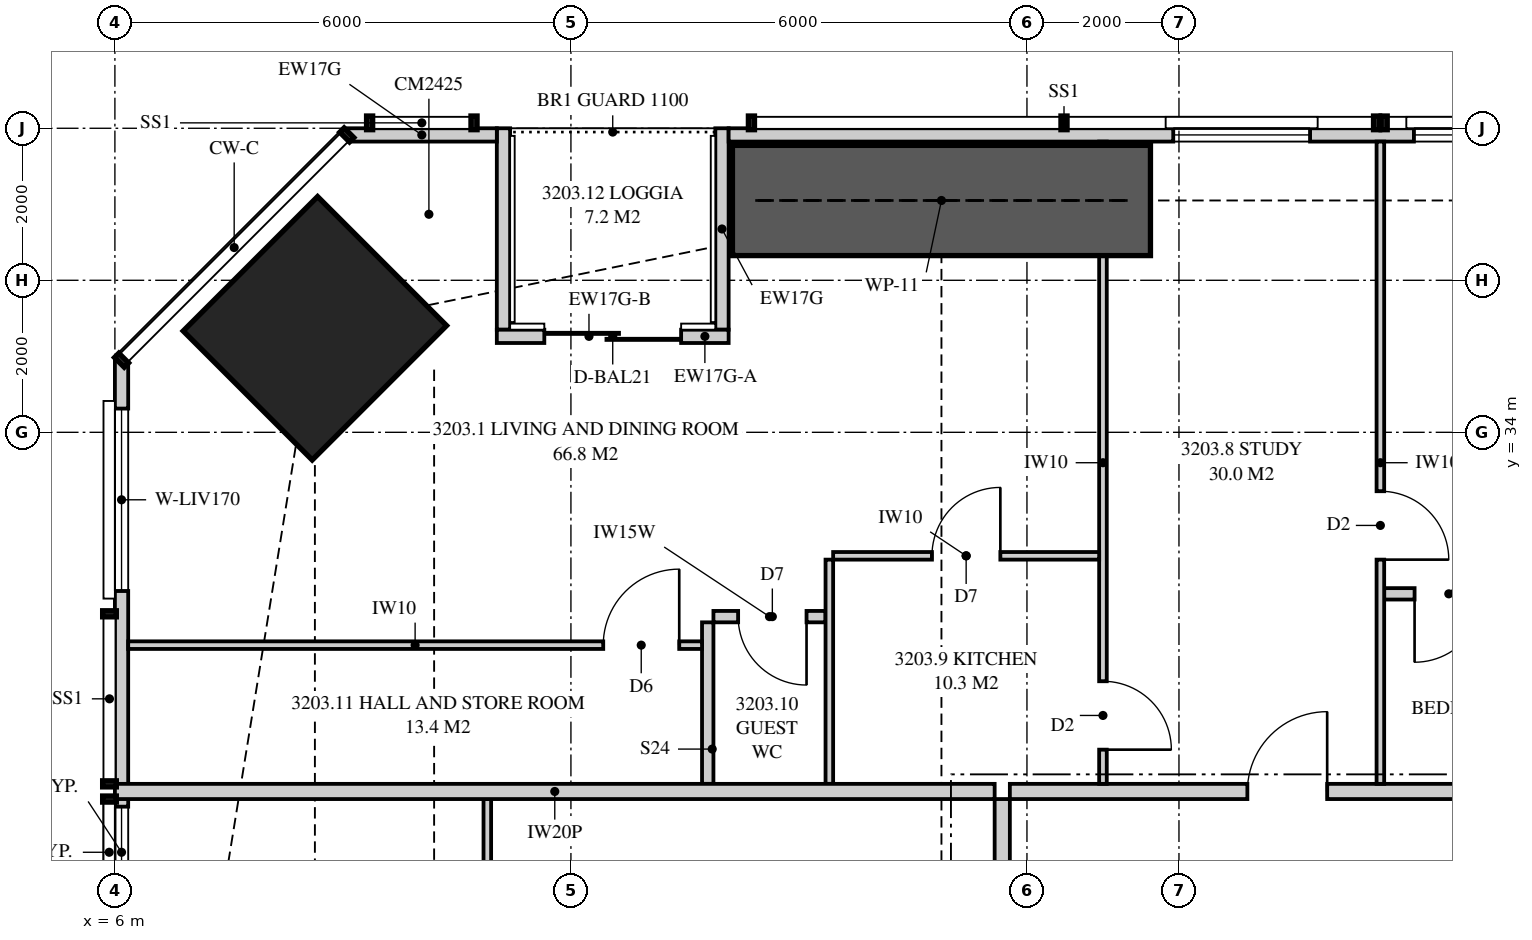
"""IFC4 building model, lengths in metres.
Left out: names, types, materials, properties, quantities, classifications, styles, units other than length and angle.
Written with IfcOpenShell. Run it as: python <this file> out.ifc"""

import sys

from ifc_helpers import new_model, si_unit, direction, frame, frame_2d, origin, origin_2d, place, context, subcontext, project, spatial, polyline, rectangle, outline, extrude, element, fill, save


model = new_model("IFC4")
c1 = context("Model", 3, precision=1e-05, world=origin(), true_north=direction((0.0, 1.0)))
c2 = subcontext(c1, "Body", "Model", "MODEL_VIEW")
j1 = project(units=[si_unit("LENGTHUNIT", "METRE"), si_unit("PLANEANGLEUNIT", "RADIAN")], contexts=[c1])
p1 = place(None, origin())
s1 = spatial("IfcSite", under=j1, at=p1, CompositionType="ELEMENT")
p2 = place(p1, origin())
s2 = spatial("IfcBuilding", under=s1, at=p2, CompositionType="ELEMENT")
p3 = place(p2, frame((0.0, 0.0, 118.25)))
s3 = spatial("IfcBuildingStorey", under=s2, at=p3, CompositionType="ELEMENT", Elevation=118.25)
p4 = place(p3, frame((8.631, 35.369, 0.0), z_axis=(0.0, 0.0, 1.0), x_axis=(0.707106781187, -0.707106781187, 0.0)))
e1 = element("IfcColumn", 1, at=p4, inside=s3, PredefinedType="COLUMN", context=c2, shape_type="SweptSolid", body=[
    extrude(rectangle(XDim=2.4, YDim=2.5, at=origin_2d()), origin(), (0.0, 0.0, 1.0), 3.35),
])
p5 = place(p3, frame((41.449, 37.913, 0.0), z_axis=(0.0, 0.0, 1.0), x_axis=(-1.0, 0.0, 0.0)))
e2 = element("IfcWall", 2, at=p5, inside=s3, PredefinedType="SOLIDWALL", context=c2, shape_type="SweptSolid", body=[
    extrude(outline(polyline([(0.0, 0.0), (27.374, 0.0), (27.374, 3.11), (24.777, 3.11), (24.777, 2.15), (24.732, 2.15), (24.732, 3.11), (24.574, 3.11), (24.574, 2.15), (2.824, 2.15), (2.824, 3.11), (2.666, 3.11), (2.666, 2.15), (2.62, 2.15), (2.62, 3.11), (0.0, 3.11), (0.0, 0.0)])), frame((0.0, 0.087, 0.0), z_axis=(0.0, -1.0, 0.0), x_axis=(1.0, 0.0, 0.0)), (0.0, 0.0, 1.0), 0.175),
])
p6 = place(p5, frame((5.699, 0.0, 0.4)))
e3 = element("IfcOpeningElement", 3, at=p6, cuts=e2, PredefinedType="OPENING", context=c2, shape_type="SweptSolid", body=[
    extrude(rectangle(XDim=1.8, YDim=1.7, at=frame_2d((0.9, 0.85))), frame((0.0, 0.097, 0.0), z_axis=(0.0, -1.0, 0.0), x_axis=(1.0, 0.0, 0.0)), (0.0, 0.0, 1.0), 0.195),
])
p7 = place(p5, frame((9.034, 0.0, 0.4)))
e4 = element("IfcOpeningElement", 4, at=p7, cuts=e2, PredefinedType="OPENING", context=c2, shape_type="SweptSolid", body=[
    extrude(rectangle(XDim=1.8, YDim=1.7, at=frame_2d((0.9, 0.85))), frame((0.0, 0.097, 0.0), z_axis=(0.0, -1.0, 0.0), x_axis=(1.0, 0.0, 0.0)), (0.0, 0.0, 1.0), 0.195),
])
p8 = place(p5, frame((16.558, 0.0, 0.4)))
e5 = element("IfcOpeningElement", 5, at=p8, cuts=e2, PredefinedType="OPENING", context=c2, shape_type="SweptSolid", body=[
    extrude(rectangle(XDim=1.8, YDim=1.7, at=frame_2d((0.9, 0.85))), frame((0.0, 0.097, 0.0), z_axis=(0.0, -1.0, 0.0), x_axis=(1.0, 0.0, 0.0)), (0.0, 0.0, 1.0), 0.195),
])
p9 = place(p5, frame((19.724, 0.0, 0.4)))
e6 = element("IfcOpeningElement", 6, at=p9, cuts=e2, PredefinedType="OPENING", context=c2, shape_type="SweptSolid", body=[
    extrude(rectangle(XDim=1.8, YDim=1.7, at=frame_2d((0.9, 0.85))), frame((0.0, 0.097, 0.0), z_axis=(0.0, -1.0, 0.0), x_axis=(1.0, 0.0, 0.0)), (0.0, 0.0, 1.0), 0.195),
])
p10 = place(p3, frame((11.025, 37.913, 0.0), z_axis=(0.0, 0.0, 1.0), x_axis=(-1.0, 0.0, 0.0)))
e7 = element("IfcWall", 7, at=p10, inside=s3, PredefinedType="SOLIDWALL", context=c2, shape_type="SweptSolid", body=[
    extrude(rectangle(XDim=1.974, YDim=0.175, at=frame_2d((0.987, 0.0))), origin(), (0.0, 0.0, 1.0), 3.11),
])
p11 = place(p3, frame((14.075, 35.262, 0.0), z_axis=(0.0, 0.0, 1.0), x_axis=(-1.0, 0.0, 0.0)))
e8 = element("IfcWall", 8, at=p11, inside=s3, PredefinedType="SOLIDWALL", context=c2, shape_type="SweptSolid", body=[
    extrude(rectangle(XDim=0.625, YDim=0.175, at=frame_2d((0.312, 0.0))), origin(), (0.0, 0.0, 1.0), 3.11),
])
p12 = place(p3, frame((13.45, 35.262, 0.0), z_axis=(0.0, 0.0, 1.0), x_axis=(-1.0, 0.0, 0.0)))
e9 = element("IfcWall", 9, at=p12, inside=s3, PredefinedType="SOLIDWALL", context=c2, shape_type="SweptSolid", body=[
    extrude(rectangle(XDim=2.425, YDim=0.175, at=frame_2d((1.212, 0.0))), origin(), (0.0, 0.0, 1.0), 2.15),
])
p13 = place(p12, origin())
e10 = element("IfcOpeningElement", 10, at=p13, cuts=e9, PredefinedType="OPENING", context=c2, shape_type="SweptSolid", body=[
    extrude(rectangle(XDim=1.8, YDim=2.1, at=frame_2d((0.9, 1.05))), frame((0.0, 0.097, 0.0), z_axis=(0.0, -1.0, 0.0), x_axis=(1.0, 0.0, 0.0)), (0.0, 0.0, 1.0), 0.195),
])
p14 = place(p3, frame((13.988, 38.0, 0.0), z_axis=(0.0, 0.0, 1.0), x_axis=(0.0, -1.0, 0.0)))
e11 = element("IfcWall", 11, at=p14, inside=s3, PredefinedType="SOLIDWALL", context=c2, shape_type="SweptSolid", body=[
    extrude(outline(polyline([(0.0, 0.0), (2.65, 0.0), (2.65, 3.11), (2.373, 3.11), (2.373, 2.15), (0.705, 2.15), (0.705, 3.11), (0.0, 3.11), (0.0, 0.0)])), frame((0.0, 0.087, 0.0), z_axis=(0.0, -1.0, 0.0), x_axis=(1.0, 0.0, 0.0)), (0.0, 0.0, 1.0), 0.175),
])
p15 = place(p3, frame((11.113, 38.0, 0.0), z_axis=(0.0, 0.0, 1.0), x_axis=(0.0, -1.0, 0.0)))
e12 = element("IfcWall", 12, at=p15, inside=s3, PredefinedType="SOLIDWALL", context=c2, shape_type="SweptSolid", body=[
    extrude(outline(polyline([(0.0, 0.0), (2.65, 0.0), (2.65, 2.15), (1.291, 2.15), (1.291, 3.11), (0.0, 3.11), (0.0, 0.0)])), frame((0.0, 0.087, 0.0), z_axis=(0.0, -1.0, 0.0), x_axis=(1.0, 0.0, 0.0)), (0.0, 0.0, 1.0), 0.175),
])
p16 = place(p3, frame((6.087, 34.949, 0.0), z_axis=(0.0, 0.0, 1.0), x_axis=(0.0, -1.0, 0.0)))
e13 = element("IfcWall", 13, at=p16, inside=s3, PredefinedType="SOLIDWALL", context=c2, shape_type="SweptSolid", body=[
    extrude(outline(polyline([(0.0, 0.0), (14.532, 0.0), (14.532, 2.15), (9.949, 2.15), (9.949, 3.11), (9.823, 3.11), (9.823, 2.15), (9.73, 2.15), (9.73, 3.11), (0.0, 3.11), (0.0, 0.0)])), frame((0.0, 0.087, 0.0), z_axis=(0.0, -1.0, 0.0), x_axis=(1.0, 0.0, 0.0)), (0.0, 0.0, 1.0), 0.175),
])
p17 = place(p16, frame((0.636, 0.0, 0.4)))
e14 = element("IfcOpeningElement", 14, at=p17, cuts=e13, PredefinedType="OPENING", context=c2, shape_type="SweptSolid", body=[
    extrude(rectangle(XDim=2.4, YDim=1.7, at=frame_2d((1.2, 0.85))), frame((0.0, 0.097, 0.0), z_axis=(0.0, -1.0, 0.0), x_axis=(1.0, 0.0, 0.0)), (0.0, 0.0, 1.0), 0.195),
])
p18 = place(p16, frame((5.874, 0.0, 0.4)))
e15 = element("IfcOpeningElement", 15, at=p18, cuts=e13, PredefinedType="OPENING", context=c2, shape_type="SweptSolid", body=[
    extrude(rectangle(XDim=1.2, YDim=1.7, at=frame_2d((0.6, 0.85))), frame((0.0, 0.097, 0.0), z_axis=(0.0, -1.0, 0.0), x_axis=(1.0, 0.0, 0.0)), (0.0, 0.0, 1.0), 0.195),
])
p19 = place(p3, frame((17.775, 29.275, 0.0), z_axis=(0.0, 0.0, 1.0), x_axis=(1.0, 0.0, 0.0)))
e16 = element("IfcWall", 16, at=p19, inside=s3, PredefinedType="PARTITIONING", context=c2, shape_type="SweptSolid", body=[
    extrude(outline(polyline([(0.0, 0.0), (18.925, 0.0), (18.925, 3.11), (10.312, 3.11), (10.312, 2.541), (9.638, 2.541), (9.638, 3.11), (0.0, 3.11), (0.0, 0.0)])), frame((0.0, 0.1, 0.0), z_axis=(0.0, -1.0, 0.0), x_axis=(1.0, 0.0, 0.0)), (0.0, 0.0, 1.0), 0.2),
])
p20 = place(p19, frame((3.125, 0.0, 0.0)))
e17 = element("IfcOpeningElement", 17, at=p20, cuts=e16, PredefinedType="OPENING", context=c2, shape_type="SweptSolid", body=[
    extrude(rectangle(XDim=1.05, YDim=2.2, at=frame_2d((0.525, 1.1))), frame((0.0, 0.11, 0.0), z_axis=(0.0, -1.0, 0.0), x_axis=(1.0, 0.0, 0.0)), (0.0, 0.0, 1.0), 0.22),
])
p21 = place(p3, frame((22.65, 37.825, 0.0), z_axis=(0.0, 0.0, 1.0), x_axis=(0.0, -1.0, 0.0)))
e18 = element("IfcWall", 18, at=p21, inside=s3, PredefinedType="PARTITIONING", context=c2, shape_type="SweptSolid", body=[
    extrude(outline(polyline([(0.0, 0.0), (8.45, 0.0), (8.45, 3.11), (1.635, 3.11), (1.635, 2.15), (0.0, 2.15), (0.0, 3.11), (0.0, 0.0)])), frame((0.0, 0.05, 0.0), z_axis=(0.0, -1.0, 0.0), x_axis=(1.0, 0.0, 0.0)), (0.0, 0.0, 1.0), 0.1),
])
p22 = place(p21, frame((4.6, 0.0, 0.0)))
e19 = element("IfcOpeningElement", 19, at=p22, cuts=e18, PredefinedType="OPENING", context=c2, shape_type="SweptSolid", body=[
    extrude(rectangle(XDim=0.9, YDim=2.1, at=frame_2d((0.45, 1.05))), frame((0.0, 0.06, 0.0), z_axis=(0.0, -1.0, 0.0), x_axis=(1.0, 0.0, 0.0)), (0.0, 0.0, 1.0), 0.12),
])
p23 = place(p3, frame((22.7, 31.875, 0.0), z_axis=(0.0, 0.0, 1.0), x_axis=(1.0, 0.0, 0.0)))
e20 = element("IfcWall", 20, at=p23, inside=s3, PredefinedType="PLUMBINGWALL", context=c2, shape_type="SweptSolid", body=[
    extrude(rectangle(XDim=4.15, YDim=0.15, at=frame_2d((2.075, 0.0))), origin(), (0.0, 0.0, 1.0), 3.11),
])
p24 = place(p23, frame((0.4, 0.0, 0.0)))
e21 = element("IfcOpeningElement", 21, at=p24, cuts=e20, PredefinedType="OPENING", context=c2, shape_type="SweptSolid", body=[
    extrude(rectangle(XDim=0.9, YDim=2.1, at=frame_2d((0.45, 1.05))), frame((0.0, 0.085, 0.0), z_axis=(0.0, -1.0, 0.0), x_axis=(1.0, 0.0, 0.0)), (0.0, 0.0, 1.0), 0.17),
])
p25 = place(p3, frame((19.0, 37.825, 0.0), z_axis=(0.0, 0.0, 1.0), x_axis=(0.0, -1.0, 0.0)))
e22 = element("IfcWall", 22, at=p25, inside=s3, PredefinedType="PARTITIONING", context=c2, shape_type="SweptSolid", body=[
    extrude(outline(polyline([(0.529, 2.15), (0.0, 2.15), (0.0, 0.0), (0.529, 0.0), (0.529, 0.017), (1.021, 0.017), (1.021, 0.0), (8.45, 0.0), (8.45, 3.11), (1.635, 3.11), (1.635, 2.15), (1.021, 2.15), (1.021, 2.133), (0.529, 2.133), (0.529, 2.15)])), frame((0.0, 0.05, 0.0), z_axis=(0.0, -1.0, 0.0), x_axis=(1.0, 0.0, 0.0)), (0.0, 0.0, 1.0), 0.1),
])
p26 = place(p25, frame((7.1, 0.0, 0.0)))
e23 = element("IfcOpeningElement", 23, at=p26, cuts=e22, PredefinedType="OPENING", context=c2, shape_type="SweptSolid", body=[
    extrude(rectangle(XDim=0.9, YDim=2.1, at=frame_2d((0.45, 1.05))), frame((0.0, 0.06, 0.0), z_axis=(0.0, -1.0, 0.0), x_axis=(1.0, 0.0, 0.0)), (0.0, 0.0, 1.0), 0.12),
])
p27 = place(p3, frame((15.45, 32.375, 0.0), z_axis=(0.0, 0.0, 1.0), x_axis=(1.0, 0.0, 0.0)))
e24 = element("IfcWall", 24, at=p27, inside=s3, PredefinedType="PARTITIONING", context=c2, shape_type="SweptSolid", body=[
    extrude(outline(polyline([(0.0, 0.0), (3.5, 0.0), (3.5, 3.11), (1.712, 3.11), (1.712, 2.541), (1.138, 2.541), (1.138, 3.11), (0.0, 3.11), (0.0, 0.0)])), frame((0.0, 0.05, 0.0), z_axis=(0.0, -1.0, 0.0), x_axis=(1.0, 0.0, 0.0)), (0.0, 0.0, 1.0), 0.1),
])
p28 = place(p27, frame((1.3, 0.0, 0.0)))
e25 = element("IfcOpeningElement", 25, at=p28, cuts=e24, PredefinedType="OPENING", context=c2, shape_type="SweptSolid", body=[
    extrude(rectangle(XDim=0.9, YDim=2.1, at=frame_2d((0.45, 1.05))), frame((0.0, 0.06, 0.0), z_axis=(0.0, -1.0, 0.0), x_axis=(1.0, 0.0, 0.0)), (0.0, 0.0, 1.0), 0.12),
])
p29 = place(p3, frame((15.4, 32.325, 0.0), z_axis=(0.0, 0.0, 1.0), x_axis=(0.0, -1.0, 0.0)))
e26 = element("IfcWall", 26, at=p29, inside=s3, PredefinedType="PARTITIONING", context=c2, shape_type="SweptSolid", body=[
    extrude(rectangle(XDim=2.95, YDim=0.1, at=frame_2d((1.475, 0.0))), origin(), (0.0, 0.0, 1.0), 3.11),
])
p30 = place(p3, frame((13.875, 31.575, 0.0), z_axis=(0.0, 0.0, 1.0), x_axis=(1.0, 0.0, 0.0)))
e27 = element("IfcWall", 27, at=p30, inside=s3, PredefinedType="PLUMBINGWALL", context=c2, shape_type="SweptSolid", body=[
    extrude(rectangle(XDim=1.475, YDim=0.15, at=frame_2d((0.738, 0.0))), origin(), (0.0, 0.0, 1.0), 3.11),
])
p31 = place(p30, frame((0.325, 0.0, 0.0)))
e28 = element("IfcOpeningElement", 28, at=p31, cuts=e27, PredefinedType="OPENING", context=c2, shape_type="SweptSolid", body=[
    extrude(rectangle(XDim=0.9, YDim=2.1, at=frame_2d((0.45, 1.05))), frame((0.0, 0.085, 0.0), z_axis=(0.0, -1.0, 0.0), x_axis=(1.0, 0.0, 0.0)), (0.0, 0.0, 1.0), 0.17),
])
p32 = place(p3, frame((13.8, 31.5, 0.0), z_axis=(0.0, 0.0, 1.0), x_axis=(0.0, -1.0, 0.0)))
e29 = element("IfcWall", 29, at=p32, inside=s3, PredefinedType="PLUMBINGWALL", context=c2, shape_type="SweptSolid", body=[
    extrude(rectangle(XDim=2.125, YDim=0.15, at=frame_2d((1.062, 0.0))), origin(), (0.0, 0.0, 1.0), 3.11),
])
p33 = place(p3, frame((6.175, 31.2, 0.0), z_axis=(0.0, 0.0, 1.0), x_axis=(1.0, 0.0, 0.0)))
e30 = element("IfcWall", 30, at=p33, inside=s3, PredefinedType="PARTITIONING", context=c2, shape_type="SweptSolid", body=[
    extrude(outline(polyline([(0.0, 0.0), (7.55, 0.0), (7.55, 3.11), (5.285, 3.11), (5.285, 2.51), (2.765, 2.51), (2.765, 3.11), (2.744, 3.11), (2.744, 2.541), (2.652, 2.541), (2.652, 2.15), (0.909, 2.15), (0.909, 3.11), (0.0, 3.11), (0.0, 0.0)])), frame((0.0, 0.05, 0.0), z_axis=(0.0, -1.0, 0.0), x_axis=(1.0, 0.0, 0.0)), (0.0, 0.0, 1.0), 0.1),
])
p34 = place(p33, frame((6.25, 0.0, 0.0)))
e31 = element("IfcOpeningElement", 31, at=p34, cuts=e30, PredefinedType="OPENING", context=c2, shape_type="SweptSolid", body=[
    extrude(rectangle(XDim=1.0, YDim=2.1, at=frame_2d((0.5, 1.05))), frame((0.0, 0.06, 0.0), z_axis=(0.0, -1.0, 0.0), x_axis=(1.0, 0.0, 0.0)), (0.0, 0.0, 1.0), 0.12),
])
p35 = place(p3, frame((6.0, 29.275, 0.0), z_axis=(0.0, 0.0, 1.0), x_axis=(1.0, 0.0, 0.0)))
e32 = element("IfcWall", 32, at=p35, inside=s3, PredefinedType="PARTITIONING", context=c2, shape_type="SweptSolid", body=[
    extrude(outline(polyline([(0.0, 0.0), (11.575, 0.0), (11.575, 3.11), (11.212, 3.11), (11.212, 2.541), (10.538, 2.541), (10.538, 3.11), (5.51, 3.11), (5.51, 2.51), (2.969, 2.51), (2.969, 2.541), (2.565, 2.541), (2.565, 2.15), (0.721, 2.15), (0.721, 3.11), (0.0, 3.11), (0.0, 0.0)])), frame((0.0, 0.1, 0.0), z_axis=(0.0, -1.0, 0.0), x_axis=(1.0, 0.0, 0.0)), (0.0, 0.0, 1.0), 0.2),
])
p36 = place(p3, frame((17.675, 19.7, 0.0), z_axis=(0.0, 0.0, 1.0), x_axis=(0.0, 1.0, 0.0)))
e33 = element("IfcWall", 33, at=p36, inside=s3, PredefinedType="PARTITIONING", context=c2, shape_type="SweptSolid", body=[
    extrude(outline(polyline([(0.0, 0.0), (9.475, 0.0), (9.475, 3.11), (7.062, 3.11), (7.062, 2.541), (6.388, 2.541), (6.388, 3.11), (0.0, 3.11), (0.0, 0.0)])), frame((0.0, 0.1, 0.0), z_axis=(0.0, -1.0, 0.0), x_axis=(1.0, 0.0, 0.0)), (0.0, 0.0, 1.0), 0.2),
])
p37 = place(p3, frame((10.9, 23.292, 0.0), z_axis=(0.0, 0.0, 1.0), x_axis=(0.0, 1.0, 0.0)))
e34 = element("IfcWall", 34, at=p37, inside=s3, PredefinedType="PARTITIONING", context=c2, shape_type="SweptSolid", body=[
    extrude(outline(polyline([(0.0, 0.0), (5.883, 0.0), (5.883, 3.11), (5.883, 2.51), (1.768, 2.51), (0.0, 2.51), (0.0, 3.11), (0.0, 0.0)])), frame((0.0, 0.05, 0.0), z_axis=(0.0, -1.0, 0.0), x_axis=(1.0, 0.0, 0.0)), (0.0, 0.0, 1.0), 0.1),
])
p38 = place(p37, frame((0.15, 0.0, 0.0)))
e35 = element("IfcOpeningElement", 35, at=p38, cuts=e34, PredefinedType="OPENING", context=c2, shape_type="SweptSolid", body=[
    extrude(rectangle(XDim=0.9, YDim=2.1, at=frame_2d((0.45, 1.05))), frame((0.0, 0.06, 0.0), z_axis=(0.0, -1.0, 0.0), x_axis=(1.0, 0.0, 0.0)), (0.0, 0.0, 1.0), 0.12),
])
p39 = place(p37, frame((4.017, 0.0, 0.0)))
e36 = element("IfcOpeningElement", 36, at=p39, cuts=e34, PredefinedType="OPENING", context=c2, shape_type="SweptSolid", body=[
    extrude(rectangle(XDim=0.9, YDim=2.1, at=frame_2d((0.45, 1.05))), frame((0.0, 0.06, 0.0), z_axis=(0.0, -1.0, 0.0), x_axis=(1.0, 0.0, 0.0)), (0.0, 0.0, 1.0), 0.12),
])
p40 = place(p3, frame((14.125, 37.05, 0.0), z_axis=(0.0, 0.0, 1.0), x_axis=(1.0, 0.0, 0.0)))
e37 = element("IfcWall", 37, at=p40, inside=s3, PredefinedType="SHEAR", context=c2, shape_type="SweptSolid", body=[
    extrude(rectangle(XDim=5.5, YDim=1.45, at=frame_2d((2.75, 0.0))), origin(), (0.0, 0.0, 1.0), 3.35),
])
p41 = place(p8, origin())
e38 = element("IfcWindow", 38, at=p41, inside=s3, PartitioningType="SINGLE_PANEL", PredefinedType="WINDOW", context=c2, shape_type="SweptSolid", body=[
    extrude(rectangle(XDim=1.8, YDim=1.7, at=frame_2d((0.9, 0.85))), frame((0.0, 0.03, 0.0), z_axis=(0.0, -1.0, 0.0), x_axis=(1.0, 0.0, 0.0)), (0.0, 0.0, 1.0), 0.06),
])
fill(e5, e38)
p42 = place(p9, origin())
e39 = element("IfcWindow", 39, at=p42, inside=s3, PartitioningType="SINGLE_PANEL", PredefinedType="WINDOW", context=c2, shape_type="SweptSolid", body=[
    extrude(rectangle(XDim=1.8, YDim=1.7, at=frame_2d((0.9, 0.85))), frame((0.0, 0.03, 0.0), z_axis=(0.0, -1.0, 0.0), x_axis=(1.0, 0.0, 0.0)), (0.0, 0.0, 1.0), 0.06),
])
fill(e6, e39)
p43 = place(p13, origin())
e40 = element("IfcDoor", 40, at=p43, inside=s3, OperationType="SLIDING_TO_LEFT", PredefinedType="DOOR", context=c2, shape_type="SweptSolid", body=[
    extrude(rectangle(XDim=1.8, YDim=2.1, at=frame_2d((0.9, 1.05))), frame((0.0, 0.025, 0.0), z_axis=(0.0, -1.0, 0.0), x_axis=(1.0, 0.0, 0.0)), (0.0, 0.0, 1.0), 0.05),
])
fill(e10, e40)
p44 = place(p17, origin())
e41 = element("IfcWindow", 41, at=p44, inside=s3, PartitioningType="SINGLE_PANEL", PredefinedType="WINDOW", context=c2, shape_type="SweptSolid", body=[
    extrude(rectangle(XDim=2.4, YDim=1.7, at=frame_2d((1.2, 0.85))), frame((0.0, 0.03, 0.0), z_axis=(0.0, -1.0, 0.0), x_axis=(1.0, 0.0, 0.0)), (0.0, 0.0, 1.0), 0.06),
])
fill(e14, e41)
p45 = place(p18, origin())
e42 = element("IfcWindow", 42, at=p45, inside=s3, PartitioningType="SINGLE_PANEL", PredefinedType="WINDOW", context=c2, shape_type="SweptSolid", body=[
    extrude(rectangle(XDim=1.2, YDim=1.7, at=frame_2d((0.6, 0.85))), frame((0.0, 0.03, 0.0), z_axis=(0.0, -1.0, 0.0), x_axis=(1.0, 0.0, 0.0)), (0.0, 0.0, 1.0), 0.06),
])
fill(e15, e42)
p46 = place(p20, origin())
e43 = element("IfcDoor", 43, at=p46, inside=s3, OperationType="SINGLE_SWING_RIGHT", PredefinedType="DOOR", context=c2, shape_type="SweptSolid", body=[
    extrude(rectangle(XDim=1.05, YDim=2.2, at=frame_2d((0.525, 1.1))), frame((0.0, 0.025, 0.0), z_axis=(0.0, -1.0, 0.0), x_axis=(1.0, 0.0, 0.0)), (0.0, 0.0, 1.0), 0.05),
])
fill(e17, e43)
p47 = place(p22, origin())
e44 = element("IfcDoor", 44, at=p47, inside=s3, OperationType="SINGLE_SWING_RIGHT", PredefinedType="DOOR", context=c2, shape_type="SweptSolid", body=[
    extrude(rectangle(XDim=0.9, YDim=2.1, at=frame_2d((0.45, 1.05))), frame((0.0, 0.025, 0.0), z_axis=(0.0, -1.0, 0.0), x_axis=(1.0, 0.0, 0.0)), (0.0, 0.0, 1.0), 0.05),
])
fill(e19, e44)
p48 = place(p24, frame((0.9, 0.0, 0.0), z_axis=(0.0, 0.0, 1.0), x_axis=(-1.0, 0.0, 0.0)))
e45 = element("IfcDoor", 45, at=p48, inside=s3, OperationType="SINGLE_SWING_RIGHT", PredefinedType="DOOR", context=c2, shape_type="SweptSolid", body=[
    extrude(rectangle(XDim=0.9, YDim=2.1, at=frame_2d((0.45, 1.05))), frame((0.0, 0.025, 0.0), z_axis=(0.0, -1.0, 0.0), x_axis=(1.0, 0.0, 0.0)), (0.0, 0.0, 1.0), 0.05),
])
fill(e21, e45)
p49 = place(p26, origin())
e46 = element("IfcDoor", 46, at=p49, inside=s3, OperationType="SINGLE_SWING_RIGHT", PredefinedType="DOOR", context=c2, shape_type="SweptSolid", body=[
    extrude(rectangle(XDim=0.9, YDim=2.1, at=frame_2d((0.45, 1.05))), frame((0.0, 0.025, 0.0), z_axis=(0.0, -1.0, 0.0), x_axis=(1.0, 0.0, 0.0)), (0.0, 0.0, 1.0), 0.05),
])
fill(e23, e46)
p50 = place(p28, origin())
e47 = element("IfcDoor", 47, at=p50, inside=s3, OperationType="SINGLE_SWING_RIGHT", PredefinedType="DOOR", context=c2, shape_type="SweptSolid", body=[
    extrude(rectangle(XDim=0.9, YDim=2.1, at=frame_2d((0.45, 1.05))), frame((0.0, 0.025, 0.0), z_axis=(0.0, -1.0, 0.0), x_axis=(1.0, 0.0, 0.0)), (0.0, 0.0, 1.0), 0.05),
])
fill(e25, e47)
p51 = place(p31, frame((0.9, 0.0, 0.0), z_axis=(0.0, 0.0, 1.0), x_axis=(-1.0, 0.0, 0.0)))
e48 = element("IfcDoor", 48, at=p51, inside=s3, OperationType="SINGLE_SWING_LEFT", PredefinedType="DOOR", context=c2, shape_type="SweptSolid", body=[
    extrude(rectangle(XDim=0.9, YDim=2.1, at=frame_2d((0.45, 1.05))), frame((0.0, 0.025, 0.0), z_axis=(0.0, -1.0, 0.0), x_axis=(1.0, 0.0, 0.0)), (0.0, 0.0, 1.0), 0.05),
])
fill(e28, e48)
p52 = place(p34, origin())
e49 = element("IfcDoor", 49, at=p52, inside=s3, OperationType="SINGLE_SWING_RIGHT", PredefinedType="DOOR", context=c2, shape_type="SweptSolid", body=[
    extrude(rectangle(XDim=1.0, YDim=2.1, at=frame_2d((0.5, 1.05))), frame((0.0, 0.025, 0.0), z_axis=(0.0, -1.0, 0.0), x_axis=(1.0, 0.0, 0.0)), (0.0, 0.0, 1.0), 0.05),
])
fill(e31, e49)
save(model, sys.argv[1])
